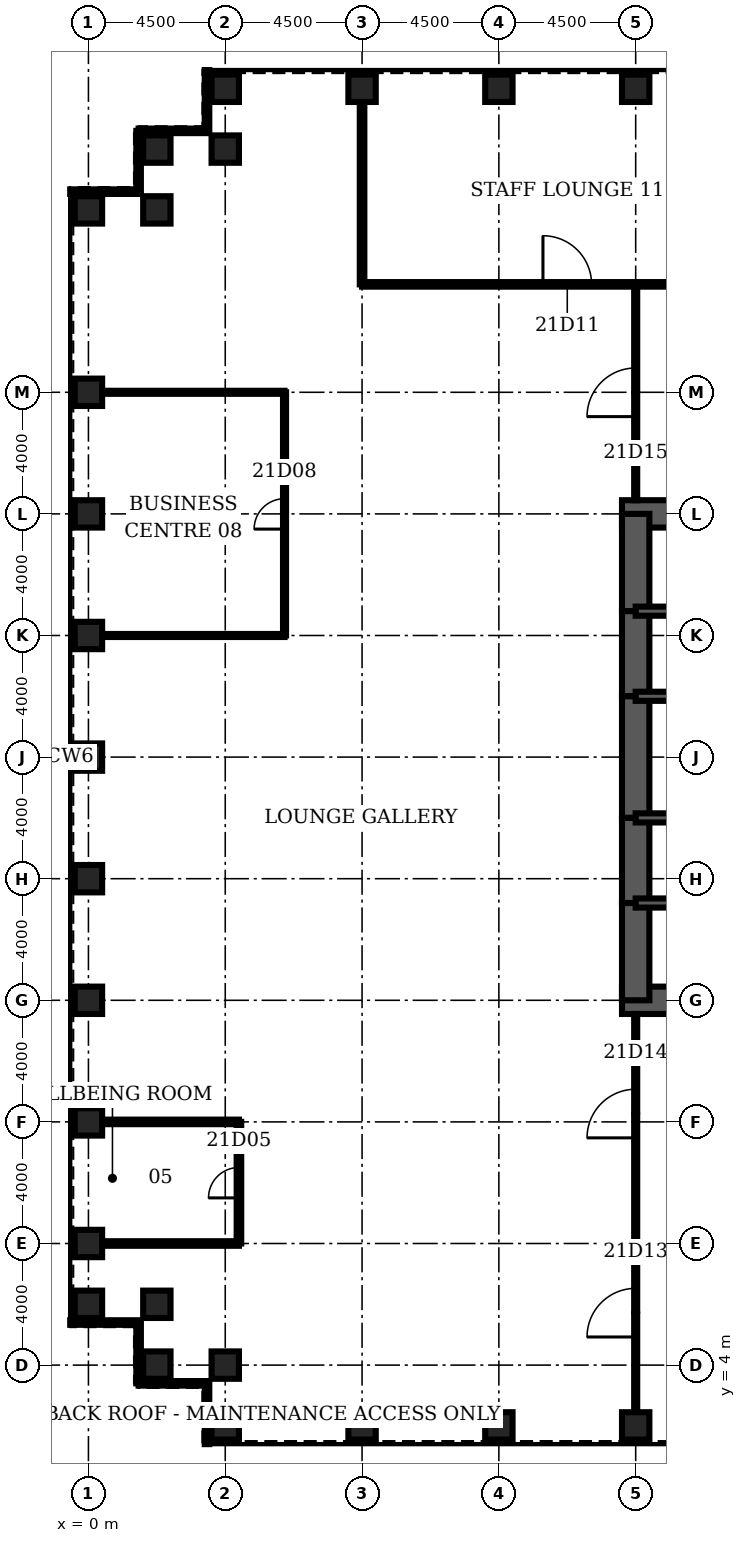
"""IFC4 building model, lengths in metres.
Left out: names, types, materials, properties, quantities, classifications, styles, units other than length and angle.
Written with IfcOpenShell. Run it as: python <this file> out.ifc"""

import sys

from ifc_helpers import new_model, si_unit, direction, frame, frame_2d, origin, origin_2d, place, context, subcontext, project, spatial, rectangle, hollow_rectangle, extrude, element, fill, save


model = new_model("IFC4")
c1 = context("Model", 3, precision=1e-05, world=origin(), true_north=direction((0.0, 1.0)))
c2 = subcontext(c1, "Body", "Model", "MODEL_VIEW")
j1 = project(units=[si_unit("LENGTHUNIT", "METRE"), si_unit("PLANEANGLEUNIT", "RADIAN")], contexts=[c1])
p1 = place(None, origin())
s1 = spatial("IfcSite", under=j1, at=p1, CompositionType="ELEMENT")
p2 = place(p1, origin())
s2 = spatial("IfcBuilding", under=s1, at=p2, CompositionType="ELEMENT")
p3 = place(p2, frame((0.0, 0.0, 100.5)))
s3 = spatial("IfcBuildingStorey", under=s2, at=p3, CompositionType="ELEMENT", Elevation=100.5)
for number, where, z_axis, x_axis in (
    (1, (4.5, 2.0, 0.0), (0.0, 0.0, 1.0), (0.0, 1.0, 0.0)),
    (2, (9.0, 2.0, 0.0), (0.0, 0.0, 1.0), (0.0, 1.0, 0.0)),
    (3, (13.5, 2.0, 0.0), (0.0, 0.0, 1.0), (0.0, 1.0, 0.0)),
    (4, (18.0, 2.0, 0.0), (0.0, 0.0, 1.0), (0.0, 1.0, 0.0)),
    (5, (18.0, 46.0, 0.0), (0.0, 0.0, 1.0), (0.0, 1.0, 0.0)),
    (6, (13.5, 46.0, 0.0), (0.0, 0.0, 1.0), (0.0, 1.0, 0.0)),
    (7, (9.0, 46.0, 0.0), (0.0, 0.0, 1.0), (0.0, 1.0, 0.0)),
    (8, (4.5, 46.0, 0.0), (0.0, 0.0, 1.0), (0.0, 1.0, 0.0)),
    (9, (4.5, 44.0, 0.0), (0.0, 0.0, 1.0), (0.0, 1.0, 0.0)),
    (10, (2.25, 44.0, 0.0), (0.0, 0.0, 1.0), (1.0, 0.0, 0.0)),
    (11, (2.25, 42.0, 0.0), (0.0, 0.0, 1.0), (1.0, 0.0, 0.0)),
    (12, (0.0, 42.0, 0.0), (0.0, 0.0, 1.0), (1.0, 0.0, 0.0)),
    (13, (0.0, 36.0, 0.0), (0.0, 0.0, 1.0), (1.0, 0.0, 0.0)),
    (14, (0.0, 32.0, 0.0), (0.0, 0.0, 1.0), (1.0, 0.0, 0.0)),
    (15, (0.0, 28.0, 0.0), (0.0, 0.0, 1.0), (1.0, 0.0, 0.0)),
    (16, (0.0, 24.0, 0.0), (0.0, 0.0, 1.0), (1.0, 0.0, 0.0)),
    (17, (0.0, 20.0, 0.0), (0.0, 0.0, 1.0), (1.0, 0.0, 0.0)),
    (18, (0.0, 16.0, 0.0), (0.0, 0.0, 1.0), (1.0, 0.0, 0.0)),
    (19, (0.0, 12.0, 0.0), (0.0, 0.0, 1.0), (1.0, 0.0, 0.0)),
    (20, (0.0, 8.0, 0.0), (0.0, 0.0, 1.0), (1.0, 0.0, 0.0)),
    (21, (0.0, 6.0, 0.0), (0.0, 0.0, 1.0), (1.0, 0.0, 0.0)),
    (22, (2.25, 6.0, 0.0), (0.0, 0.0, 1.0), (1.0, 0.0, 0.0)),
    (23, (2.25, 4.0, 0.0), (0.0, 0.0, 1.0), (1.0, 0.0, 0.0)),
    (24, (4.5, 4.0, 0.0), (0.0, 0.0, 1.0), (0.0, 1.0, 0.0)),
):
    element("IfcColumn", number, at=place(p3, frame(where, z_axis=z_axis, x_axis=x_axis)), inside=s3, PredefinedType="COLUMN", context=c2, shape_type="SweptSolid", body=[
        extrude(hollow_rectangle(XDim=0.9, YDim=0.9, WallThickness=0.11, at=origin_2d()), origin(), (0.0, 0.0, 1.0), 4.2),
    ])
for number, where, z_axis, x_axis in (
    (25, (17.55, 16.0, 0.0), (0.0, 0.0, 1.0), (1.0, 0.0, 0.0)),
    (26, (27.0, 32.0, 0.0), (0.0, 0.0, 1.0), (-1.0, 0.0, 0.0)),
):
    element("IfcWall", number, at=place(p3, frame(where, z_axis=z_axis, x_axis=x_axis)), inside=s3, PredefinedType="SHEAR", context=c2, shape_type="SweptSolid", body=[
        extrude(rectangle(XDim=9.45, YDim=0.9, at=frame_2d((4.725, 0.0))), origin(), (0.0, 0.0, 1.0), 4.2),
    ])
p4 = place(p3, frame((18.0, 32.0, 0.0), z_axis=(0.0, 0.0, 1.0), x_axis=(0.0, -1.0, 0.0)))
e27 = element("IfcWall", 27, at=p4, inside=s3, PredefinedType="SHEAR", context=c2, shape_type="SweptSolid", body=[
    extrude(rectangle(XDim=3.2, YDim=0.9, at=frame_2d((1.6, 0.0))), origin(), (0.0, 0.0, 1.0), 4.2),
])
p5 = place(p3, frame((18.0, 28.8, 0.0), z_axis=(0.0, 0.0, 1.0), x_axis=(0.0, -1.0, 0.0)))
e28 = element("IfcWall", 28, at=p5, inside=s3, PredefinedType="SHEAR", context=c2, shape_type="SweptSolid", body=[
    extrude(rectangle(XDim=2.8, YDim=0.9, at=frame_2d((1.4, 0.0))), origin(), (0.0, 0.0, 1.0), 4.2),
])
p6 = place(p5, frame((0.4, 0.0, 0.0)))
e29 = element("IfcOpeningElement", 29, at=p6, cuts=e28, PredefinedType="OPENING", context=c2, shape_type="SweptSolid", body=[
    extrude(rectangle(XDim=1.8, YDim=2.1, at=frame_2d((0.9, 1.05))), frame((0.0, 0.46, 0.0), z_axis=(0.0, -1.0, 0.0), x_axis=(1.0, 0.0, 0.0)), (0.0, 0.0, 1.0), 0.92),
])
p7 = place(p3, frame((18.0, 26.0, 0.0), z_axis=(0.0, 0.0, 1.0), x_axis=(0.0, -1.0, 0.0)))
e30 = element("IfcWall", 30, at=p7, inside=s3, PredefinedType="SHEAR", context=c2, shape_type="SweptSolid", body=[
    extrude(rectangle(XDim=4.0, YDim=0.9, at=frame_2d((2.0, 0.0))), origin(), (0.0, 0.0, 1.0), 4.2),
])
p8 = place(p3, frame((18.0, 22.0, 0.0), z_axis=(0.0, 0.0, 1.0), x_axis=(0.0, -1.0, 0.0)))
e31 = element("IfcWall", 31, at=p8, inside=s3, PredefinedType="SHEAR", context=c2, shape_type="SweptSolid", body=[
    extrude(rectangle(XDim=2.8, YDim=0.9, at=frame_2d((1.4, 0.0))), origin(), (0.0, 0.0, 1.0), 4.2),
])
p9 = place(p8, frame((0.6, 0.0, 0.0)))
e32 = element("IfcOpeningElement", 32, at=p9, cuts=e31, PredefinedType="OPENING", context=c2, shape_type="SweptSolid", body=[
    extrude(rectangle(XDim=1.8, YDim=2.1, at=frame_2d((0.9, 1.05))), frame((0.0, 0.46, 0.0), z_axis=(0.0, -1.0, 0.0), x_axis=(1.0, 0.0, 0.0)), (0.0, 0.0, 1.0), 0.92),
])
p10 = place(p3, frame((18.0, 19.2, 0.0), z_axis=(0.0, 0.0, 1.0), x_axis=(0.0, -1.0, 0.0)))
e33 = element("IfcWall", 33, at=p10, inside=s3, PredefinedType="SHEAR", context=c2, shape_type="SweptSolid", body=[
    extrude(rectangle(XDim=3.2, YDim=0.9, at=frame_2d((1.6, 0.0))), origin(), (0.0, 0.0, 1.0), 4.2),
])
p11 = place(p3, frame((18.0, 19.2, 0.0), z_axis=(0.0, 0.0, 1.0), x_axis=(1.0, 0.0, 0.0)))
e34 = element("IfcWall", 34, at=p11, inside=s3, PredefinedType="SOLIDWALL", context=c2, shape_type="SweptSolid", body=[
    extrude(rectangle(XDim=9.0, YDim=0.3, at=frame_2d((4.5, 0.0))), origin(), (0.0, 0.0, 1.0), 4.2),
])
p12 = place(p11, frame((0.65, 0.0, 0.0)))
e35 = element("IfcOpeningElement", 35, at=p12, cuts=e34, PredefinedType="OPENING", context=c2, shape_type="SweptSolid", body=[
    extrude(rectangle(XDim=1.0, YDim=2.1, at=frame_2d((0.5, 1.05))), frame((0.0, 0.16, 0.0), z_axis=(0.0, -1.0, 0.0), x_axis=(1.0, 0.0, 0.0)), (0.0, 0.0, 1.0), 0.32),
])
p13 = place(p3, frame((18.0, 28.8, 0.0), z_axis=(0.0, 0.0, 1.0), x_axis=(1.0, 0.0, 0.0)))
e36 = element("IfcWall", 36, at=p13, inside=s3, PredefinedType="SOLIDWALL", context=c2, shape_type="SweptSolid", body=[
    extrude(rectangle(XDim=9.0, YDim=0.3, at=frame_2d((4.5, 0.0))), origin(), (0.0, 0.0, 1.0), 4.2),
])
p14 = place(p13, frame((0.65, 0.0, 0.0)))
e37 = element("IfcOpeningElement", 37, at=p14, cuts=e36, PredefinedType="OPENING", context=c2, shape_type="SweptSolid", body=[
    extrude(rectangle(XDim=1.0, YDim=2.1, at=frame_2d((0.5, 1.05))), frame((0.0, 0.16, 0.0), z_axis=(0.0, -1.0, 0.0), x_axis=(1.0, 0.0, 0.0)), (0.0, 0.0, 1.0), 0.32),
])
p15 = place(p3, frame((18.0, 22.0, 0.0), z_axis=(0.0, 0.0, 1.0), x_axis=(1.0, 0.0, 0.0)))
e38 = element("IfcWall", 38, at=p15, inside=s3, PredefinedType="SOLIDWALL", context=c2, shape_type="SweptSolid", body=[
    extrude(rectangle(XDim=6.0, YDim=0.3, at=frame_2d((3.0, 0.0))), origin(), (0.0, 0.0, 1.0), 4.2),
])
p16 = place(p15, frame((2.0, 0.0, 0.0)))
e39 = element("IfcOpeningElement", 39, at=p16, cuts=e38, PredefinedType="OPENING", context=c2, shape_type="SweptSolid", body=[
    extrude(rectangle(XDim=1.0, YDim=2.1, at=frame_2d((0.5, 1.05))), frame((0.0, 0.16, 0.0), z_axis=(0.0, -1.0, 0.0), x_axis=(1.0, 0.0, 0.0)), (0.0, 0.0, 1.0), 0.32),
])
p17 = place(p3, frame((18.0, 26.0, 0.0), z_axis=(0.0, 0.0, 1.0), x_axis=(1.0, 0.0, 0.0)))
e40 = element("IfcWall", 40, at=p17, inside=s3, PredefinedType="SOLIDWALL", context=c2, shape_type="SweptSolid", body=[
    extrude(rectangle(XDim=6.0, YDim=0.3, at=frame_2d((3.0, 0.0))), origin(), (0.0, 0.0, 1.0), 4.2),
])
for number, where, z_axis, x_axis in (
    (41, (0.45, 8.0, 0.0), (0.0, 0.0, 1.0), (1.0, 0.0, 0.0)),
    (42, (0.45, 12.0, 0.0), (0.0, 0.0, 1.0), (1.0, 0.0, 0.0)),
):
    element("IfcWall", number, at=place(p3, frame(where, z_axis=z_axis, x_axis=x_axis)), inside=s3, PredefinedType="PARTITIONING", context=c2, shape_type="SweptSolid", body=[
        extrude(rectangle(XDim=4.5, YDim=0.15, at=frame_2d((2.25, 0.0))), origin(), (0.0, 0.0, 1.0), 3.0),
    ])
for number, where, z_axis, x_axis in (
    (43, (0.45, 28.0, 0.0), (0.0, 0.0, 1.0), (1.0, 0.0, 0.0)),
    (44, (0.45, 36.0, 0.0), (0.0, 0.0, 1.0), (1.0, 0.0, 0.0)),
):
    element("IfcWall", number, at=place(p3, frame(where, z_axis=z_axis, x_axis=x_axis)), inside=s3, PredefinedType="PARTITIONING", context=c2, shape_type="SweptSolid", body=[
        extrude(rectangle(XDim=6.0, YDim=0.1, at=frame_2d((3.0, 0.0))), origin(), (0.0, 0.0, 1.0), 3.0),
    ])
p18 = place(p3, frame((9.0, 39.55, 0.0), z_axis=(0.0, 0.0, 1.0), x_axis=(1.0, 0.0, 0.0)))
e45 = element("IfcWall", 45, at=p18, inside=s3, PredefinedType="PARTITIONING", context=c2, shape_type="SweptSolid", body=[
    extrude(rectangle(XDim=13.5, YDim=0.15, at=frame_2d((6.75, 0.0))), origin(), (0.0, 0.0, 1.0), 3.0),
])
p19 = place(p18, frame((5.95, 0.0, 0.0)))
e46 = element("IfcOpeningElement", 46, at=p19, cuts=e45, PredefinedType="OPENING", context=c2, shape_type="SweptSolid", body=[
    extrude(rectangle(XDim=1.6, YDim=2.1, at=frame_2d((0.8, 1.05))), frame((0.0, 0.085, 0.0), z_axis=(0.0, -1.0, 0.0), x_axis=(1.0, 0.0, 0.0)), (0.0, 0.0, 1.0), 0.17),
])
p20 = place(p3, frame((4.95, 8.0, 0.0), z_axis=(0.0, 0.0, 1.0), x_axis=(0.0, 1.0, 0.0)))
e47 = element("IfcWall", 47, at=p20, inside=s3, PredefinedType="PARTITIONING", context=c2, shape_type="SweptSolid", body=[
    extrude(rectangle(XDim=4.0, YDim=0.15, at=frame_2d((2.0, 0.0))), origin(), (0.0, 0.0, 1.0), 3.0),
])
p21 = place(p20, frame((1.5, 0.0, 0.0)))
e48 = element("IfcOpeningElement", 48, at=p21, cuts=e47, PredefinedType="OPENING", context=c2, shape_type="SweptSolid", body=[
    extrude(rectangle(XDim=1.0, YDim=2.1, at=frame_2d((0.5, 1.05))), frame((0.0, 0.085, 0.0), z_axis=(0.0, -1.0, 0.0), x_axis=(1.0, 0.0, 0.0)), (0.0, 0.0, 1.0), 0.17),
])
p22 = place(p3, frame((6.45, 28.0, 0.0), z_axis=(0.0, 0.0, 1.0), x_axis=(0.0, 1.0, 0.0)))
e49 = element("IfcWall", 49, at=p22, inside=s3, PredefinedType="PARTITIONING", context=c2, shape_type="SweptSolid", body=[
    extrude(rectangle(XDim=8.0, YDim=0.1, at=frame_2d((4.0, 0.0))), origin(), (0.0, 0.0, 1.0), 3.0),
])
p23 = place(p22, frame((3.5, 0.0, 0.0)))
e50 = element("IfcOpeningElement", 50, at=p23, cuts=e49, PredefinedType="OPENING", context=c2, shape_type="SweptSolid", body=[
    extrude(rectangle(XDim=1.0, YDim=2.1, at=frame_2d((0.5, 1.05))), frame((0.0, 0.06, 0.0), z_axis=(0.0, -1.0, 0.0), x_axis=(1.0, 0.0, 0.0)), (0.0, 0.0, 1.0), 0.12),
])
p24 = place(p3, frame((9.0, 39.55, 0.0), z_axis=(0.0, 0.0, 1.0), x_axis=(0.0, 1.0, 0.0)))
e51 = element("IfcWall", 51, at=p24, inside=s3, PredefinedType="PARTITIONING", context=c2, shape_type="SweptSolid", body=[
    extrude(rectangle(XDim=6.0, YDim=0.15, at=frame_2d((3.0, 0.0))), origin(), (0.0, 0.0, 1.0), 3.0),
])
p25 = place(p3, frame((18.0, 2.45, 0.0), z_axis=(0.0, 0.0, 1.0), x_axis=(0.0, 1.0, 0.0)))
e52 = element("IfcWall", 52, at=p25, inside=s3, PredefinedType="PARTITIONING", context=c2, shape_type="SweptSolid", body=[
    extrude(rectangle(XDim=13.1, YDim=0.1, at=frame_2d((6.55, 0.0))), origin(), (0.0, 0.0, 1.0), 3.0),
])
p26 = place(p25, frame((2.475, 0.0, 0.0)))
e53 = element("IfcOpeningElement", 53, at=p26, cuts=e52, PredefinedType="OPENING", context=c2, shape_type="SweptSolid", body=[
    extrude(rectangle(XDim=1.6, YDim=2.1, at=frame_2d((0.8, 1.05))), frame((0.0, 0.06, 0.0), z_axis=(0.0, -1.0, 0.0), x_axis=(1.0, 0.0, 0.0)), (0.0, 0.0, 1.0), 0.12),
])
p27 = place(p25, frame((9.025, 0.0, 0.0)))
e54 = element("IfcOpeningElement", 54, at=p27, cuts=e52, PredefinedType="OPENING", context=c2, shape_type="SweptSolid", body=[
    extrude(rectangle(XDim=1.6, YDim=2.1, at=frame_2d((0.8, 1.05))), frame((0.0, 0.06, 0.0), z_axis=(0.0, -1.0, 0.0), x_axis=(1.0, 0.0, 0.0)), (0.0, 0.0, 1.0), 0.12),
])
p28 = place(p3, frame((18.0, 32.45, 0.0), z_axis=(0.0, 0.0, 1.0), x_axis=(0.0, 1.0, 0.0)))
e55 = element("IfcWall", 55, at=p28, inside=s3, PredefinedType="PARTITIONING", context=c2, shape_type="SweptSolid", body=[
    extrude(rectangle(XDim=7.1, YDim=0.1, at=frame_2d((3.55, 0.0))), origin(), (0.0, 0.0, 1.0), 3.0),
])
p29 = place(p28, frame((2.75, 0.0, 0.0)))
e56 = element("IfcOpeningElement", 56, at=p29, cuts=e55, PredefinedType="OPENING", context=c2, shape_type="SweptSolid", body=[
    extrude(rectangle(XDim=1.6, YDim=2.1, at=frame_2d((0.8, 1.05))), frame((0.0, 0.06, 0.0), z_axis=(0.0, -1.0, 0.0), x_axis=(1.0, 0.0, 0.0)), (0.0, 0.0, 1.0), 0.12),
])
p30 = place(p3, frame((3.9, 46.6, 0.0), z_axis=(0.0, 0.0, 1.0), x_axis=(0.0, -1.0, 0.0)))
e57 = element("IfcWall", 57, at=p30, inside=s3, PredefinedType="ELEMENTEDWALL", context=c2, shape_type="SweptSolid", body=[
    extrude(rectangle(XDim=2.0, YDim=0.15, at=frame_2d((1.0, 0.0))), origin(), (0.0, 0.0, 1.0), 4.04),
])
p31 = place(p3, frame((3.9, 44.6, 0.0), z_axis=(0.0, 0.0, 1.0), x_axis=(-1.0, 0.0, 0.0)))
e58 = element("IfcWall", 58, at=p31, inside=s3, PredefinedType="ELEMENTEDWALL", context=c2, shape_type="SweptSolid", body=[
    extrude(rectangle(XDim=2.25, YDim=0.15, at=frame_2d((1.125, 0.0))), origin(), (0.0, 0.0, 1.0), 4.04),
])
p32 = place(p3, frame((1.65, 44.6, 0.0), z_axis=(0.0, 0.0, 1.0), x_axis=(0.0, -1.0, 0.0)))
e59 = element("IfcWall", 59, at=p32, inside=s3, PredefinedType="ELEMENTEDWALL", context=c2, shape_type="SweptSolid", body=[
    extrude(rectangle(XDim=2.0, YDim=0.15, at=frame_2d((1.0, 0.0))), origin(), (0.0, 0.0, 1.0), 4.04),
])
for number, where, z_axis, x_axis in (
    (60, (1.65, 42.6, 0.0), (0.0, 0.0, 1.0), (-1.0, 0.0, 0.0)),
    (61, (-0.6, 5.4, 0.0), (0.0, 0.0, 1.0), (1.0, 0.0, 0.0)),
):
    element("IfcWall", number, at=place(p3, frame(where, z_axis=z_axis, x_axis=x_axis)), inside=s3, PredefinedType="ELEMENTEDWALL", context=c2, shape_type="SweptSolid", body=[
        extrude(rectangle(XDim=2.25, YDim=0.15, at=frame_2d((1.125, 0.0))), origin(), (0.0, 0.0, 1.0), 4.04),
    ])
p33 = place(p3, frame((1.65, 5.4, 0.0), z_axis=(0.0, 0.0, 1.0), x_axis=(0.0, -1.0, 0.0)))
e62 = element("IfcWall", 62, at=p33, inside=s3, PredefinedType="ELEMENTEDWALL", context=c2, shape_type="SweptSolid", body=[
    extrude(rectangle(XDim=2.0, YDim=0.15, at=frame_2d((1.0, 0.0))), origin(), (0.0, 0.0, 1.0), 4.04),
])
p34 = place(p3, frame((1.65, 3.4, 0.0), z_axis=(0.0, 0.0, 1.0), x_axis=(1.0, 0.0, 0.0)))
e63 = element("IfcWall", 63, at=p34, inside=s3, PredefinedType="ELEMENTEDWALL", context=c2, shape_type="SweptSolid", body=[
    extrude(rectangle(XDim=2.25, YDim=0.15, at=frame_2d((1.125, 0.0))), origin(), (0.0, 0.0, 1.0), 4.04),
])
p35 = place(p3, frame((3.9, 3.4, 0.0), z_axis=(0.0, 0.0, 1.0), x_axis=(0.0, -1.0, 0.0)))
e64 = element("IfcWall", 64, at=p35, inside=s3, PredefinedType="ELEMENTEDWALL", context=c2, shape_type="SweptSolid", body=[
    extrude(rectangle(XDim=2.0, YDim=0.15, at=frame_2d((1.0, 0.0))), origin(), (0.0, 0.0, 1.0), 4.04),
])
p36 = place(p21, origin())
e65 = element("IfcDoor", 65, at=p36, inside=s3, OperationType="SINGLE_SWING_LEFT", PredefinedType="DOOR", context=c2, shape_type="SweptSolid", body=[
    extrude(rectangle(XDim=1.0, YDim=2.1, at=frame_2d((0.5, 1.05))), frame((0.0, 0.025, 0.0), z_axis=(0.0, -1.0, 0.0), x_axis=(1.0, 0.0, 0.0)), (0.0, 0.0, 1.0), 0.05),
])
fill(e48, e65)
p37 = place(p23, origin())
e66 = element("IfcDoor", 66, at=p37, inside=s3, OperationType="SINGLE_SWING_LEFT", PredefinedType="DOOR", context=c2, shape_type="SweptSolid", body=[
    extrude(rectangle(XDim=1.0, YDim=2.1, at=frame_2d((0.5, 1.05))), frame((0.0, 0.025, 0.0), z_axis=(0.0, -1.0, 0.0), x_axis=(1.0, 0.0, 0.0)), (0.0, 0.0, 1.0), 0.05),
])
fill(e50, e66)
p38 = place(p19, origin())
e67 = element("IfcDoor", 67, at=p38, inside=s3, OperationType="SINGLE_SWING_LEFT", PredefinedType="DOOR", context=c2, shape_type="SweptSolid", body=[
    extrude(rectangle(XDim=1.6, YDim=2.1, at=frame_2d((0.8, 1.05))), frame((0.0, 0.025, 0.0), z_axis=(0.0, -1.0, 0.0), x_axis=(1.0, 0.0, 0.0)), (0.0, 0.0, 1.0), 0.05),
])
fill(e46, e67)
p39 = place(p26, origin())
e68 = element("IfcDoor", 68, at=p39, inside=s3, OperationType="SINGLE_SWING_LEFT", PredefinedType="DOOR", context=c2, shape_type="SweptSolid", body=[
    extrude(rectangle(XDim=1.6, YDim=2.1, at=frame_2d((0.8, 1.05))), frame((0.0, 0.025, 0.0), z_axis=(0.0, -1.0, 0.0), x_axis=(1.0, 0.0, 0.0)), (0.0, 0.0, 1.0), 0.05),
])
fill(e53, e68)
p40 = place(p27, origin())
e69 = element("IfcDoor", 69, at=p40, inside=s3, OperationType="SINGLE_SWING_LEFT", PredefinedType="DOOR", context=c2, shape_type="SweptSolid", body=[
    extrude(rectangle(XDim=1.6, YDim=2.1, at=frame_2d((0.8, 1.05))), frame((0.0, 0.025, 0.0), z_axis=(0.0, -1.0, 0.0), x_axis=(1.0, 0.0, 0.0)), (0.0, 0.0, 1.0), 0.05),
])
fill(e54, e69)
p41 = place(p29, origin())
e70 = element("IfcDoor", 70, at=p41, inside=s3, OperationType="SINGLE_SWING_LEFT", PredefinedType="DOOR", context=c2, shape_type="SweptSolid", body=[
    extrude(rectangle(XDim=1.6, YDim=2.1, at=frame_2d((0.8, 1.05))), frame((0.0, 0.025, 0.0), z_axis=(0.0, -1.0, 0.0), x_axis=(1.0, 0.0, 0.0)), (0.0, 0.0, 1.0), 0.05),
])
fill(e56, e70)
p42 = place(p12, origin())
e71 = element("IfcDoor", 71, at=p42, inside=s3, OperationType="SINGLE_SWING_LEFT", PredefinedType="DOOR", context=c2, shape_type="SweptSolid", body=[
    extrude(rectangle(XDim=1.0, YDim=2.1, at=frame_2d((0.5, 1.05))), frame((0.0, 0.025, 0.0), z_axis=(0.0, -1.0, 0.0), x_axis=(1.0, 0.0, 0.0)), (0.0, 0.0, 1.0), 0.05),
])
fill(e35, e71)
p43 = place(p14, origin())
e72 = element("IfcDoor", 72, at=p43, inside=s3, OperationType="SINGLE_SWING_LEFT", PredefinedType="DOOR", context=c2, shape_type="SweptSolid", body=[
    extrude(rectangle(XDim=1.0, YDim=2.1, at=frame_2d((0.5, 1.05))), frame((0.0, 0.025, 0.0), z_axis=(0.0, -1.0, 0.0), x_axis=(1.0, 0.0, 0.0)), (0.0, 0.0, 1.0), 0.05),
])
fill(e37, e72)
p44 = place(p9, origin())
e73 = element("IfcDoor", 73, at=p44, inside=s3, OperationType="SINGLE_SWING_LEFT", PredefinedType="DOOR", context=c2, shape_type="SweptSolid", body=[
    extrude(rectangle(XDim=1.8, YDim=2.1, at=frame_2d((0.9, 1.05))), frame((0.0, 0.45, 0.0), z_axis=(0.0, -1.0, 0.0), x_axis=(1.0, 0.0, 0.0)), (0.0, 0.0, 1.0), 0.899),
])
fill(e32, e73)
p45 = place(p6, origin())
e74 = element("IfcDoor", 74, at=p45, inside=s3, OperationType="SINGLE_SWING_LEFT", PredefinedType="DOOR", context=c2, shape_type="SweptSolid", body=[
    extrude(rectangle(XDim=1.8, YDim=2.1, at=frame_2d((0.9, 1.05))), frame((0.0, 0.45, 0.0), z_axis=(0.0, -1.0, 0.0), x_axis=(1.0, 0.0, 0.0)), (0.0, 0.0, 1.0), 0.899),
])
fill(e29, e74)
save(model, sys.argv[1])
